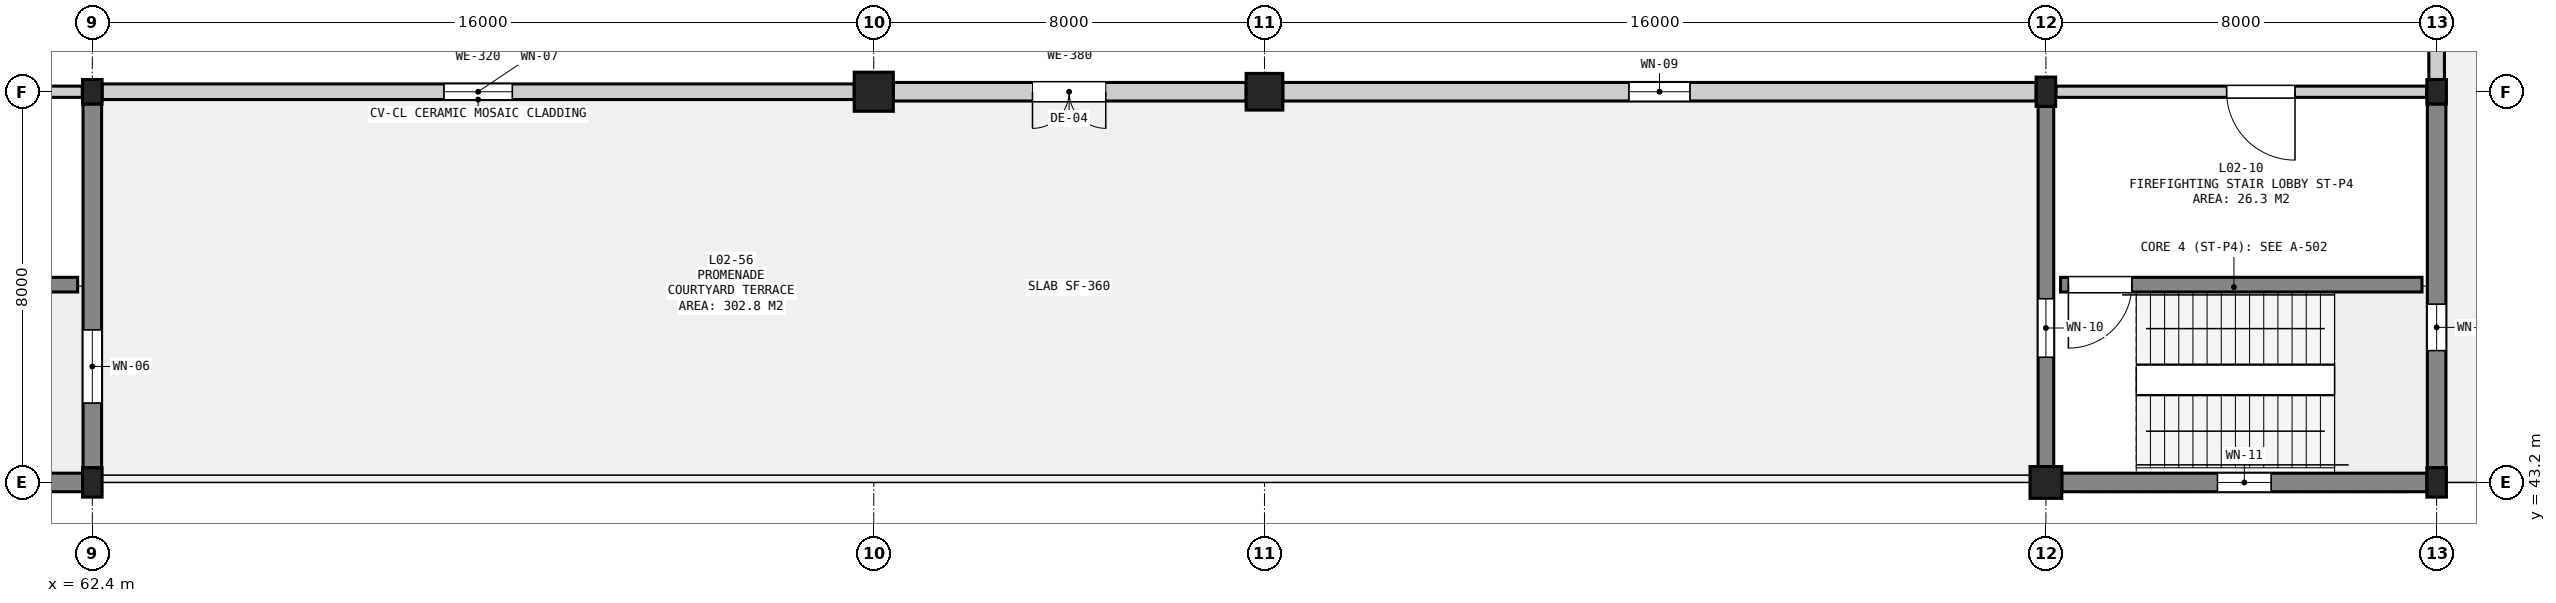
"""IFC4 building model, lengths in metres.
Left out: names, types, materials, properties, quantities, classifications, styles, units other than length and angle.
Written with IfcOpenShell. Run it as: python <this file> out.ifc"""

import sys

from ifc_helpers import new_model, si_unit, direction, frame, frame_2d, origin, origin_2d, place, context, subcontext, project, spatial, rectangle, extrude, element, fill, save


model = new_model("IFC4")
c1 = context("Model", 3, precision=1e-05, world=origin(), true_north=direction((0.0, 1.0)))
c2 = subcontext(c1, "Body", "Model", "MODEL_VIEW")
j1 = project(units=[si_unit("LENGTHUNIT", "METRE"), si_unit("PLANEANGLEUNIT", "RADIAN")], contexts=[c1])
p1 = place(None, origin())
s1 = spatial("IfcSite", under=j1, at=p1, CompositionType="ELEMENT")
p2 = place(p1, origin())
s2 = spatial("IfcBuilding", under=s1, at=p2, CompositionType="ELEMENT")
p3 = place(p2, frame((0.0, 0.0, 10.8)))
s3 = spatial("IfcBuildingStorey", under=s2, at=p3, CompositionType="ELEMENT", Elevation=10.8)
p4 = place(p3, frame((62.4, 43.2, 0.0), z_axis=(0.0, 0.0, 1.0), x_axis=(1.0, 0.0, 0.0)))
e1 = element("IfcColumn", 1, at=p4, inside=s3, PredefinedType="COLUMN", context=c2, shape_type="SweptSolid", body=[
    extrude(rectangle(XDim=0.4, YDim=0.6, at=origin_2d()), origin(), (0.0, 0.0, 1.0), 4.8),
])
p5 = place(p3, frame((62.4, 51.2, 0.0), z_axis=(0.0, 0.0, 1.0), x_axis=(1.0, 0.0, 0.0)))
e2 = element("IfcColumn", 2, at=p5, inside=s3, PredefinedType="COLUMN", context=c2, shape_type="SweptSolid", body=[
    extrude(rectangle(XDim=0.4, YDim=0.5, at=origin_2d()), origin(), (0.0, 0.0, 1.0), 4.8),
])
p6 = place(p3, frame((78.4, 51.2, 0.0), z_axis=(0.0, 0.0, 1.0), x_axis=(1.0, 0.0, 0.0)))
e3 = element("IfcColumn", 3, at=p6, inside=s3, PredefinedType="COLUMN", context=c2, shape_type="SweptSolid", body=[
    extrude(rectangle(XDim=0.8, YDim=0.8, at=origin_2d()), origin(), (0.0, 0.0, 1.0), 4.8),
])
p7 = place(p3, frame((86.4, 51.2, 0.0), z_axis=(0.0, 0.0, 1.0), x_axis=(1.0, 0.0, 0.0)))
e4 = element("IfcColumn", 4, at=p7, inside=s3, PredefinedType="COLUMN", context=c2, shape_type="SweptSolid", body=[
    extrude(rectangle(XDim=0.75, YDim=0.75, at=origin_2d()), origin(), (0.0, 0.0, 1.0), 4.8),
])
p8 = place(p3, frame((102.4, 43.2, 0.0), z_axis=(0.0, 0.0, 1.0), x_axis=(1.0, 0.0, 0.0)))
e5 = element("IfcColumn", 5, at=p8, inside=s3, PredefinedType="COLUMN", context=c2, shape_type="SweptSolid", body=[
    extrude(rectangle(XDim=0.65, YDim=0.65, at=origin_2d()), origin(), (0.0, 0.0, 1.0), 4.8),
])
for number, where, z_axis, x_axis in (
    (6, (102.4, 51.2, 0.0), (0.0, 0.0, 1.0), (1.0, 0.0, 0.0)),
    (7, (110.4, 43.2, 0.0), (0.0, 0.0, 1.0), (1.0, 0.0, 0.0)),
):
    element("IfcColumn", number, at=place(p3, frame(where, z_axis=z_axis, x_axis=x_axis)), inside=s3, PredefinedType="COLUMN", context=c2, shape_type="SweptSolid", body=[
        extrude(rectangle(XDim=0.4, YDim=0.6, at=origin_2d()), origin(), (0.0, 0.0, 1.0), 4.8),
    ])
p9 = place(p3, frame((110.4, 51.2, 0.0), z_axis=(0.0, 0.0, 1.0), x_axis=(1.0, 0.0, 0.0)))
e8 = element("IfcColumn", 8, at=p9, inside=s3, PredefinedType="COLUMN", context=c2, shape_type="SweptSolid", body=[
    extrude(rectangle(XDim=0.4, YDim=0.5, at=origin_2d()), origin(), (0.0, 0.0, 1.0), 4.8),
])
p10 = place(p3, frame((54.725, 43.2, 0.0), z_axis=(0.0, 0.0, 1.0), x_axis=(1.0, 0.0, 0.0)))
e9 = element("IfcWall", 9, at=p10, inside=s3, PredefinedType="SOLIDWALL", context=c2, shape_type="SweptSolid", body=[
    extrude(rectangle(XDim=7.475, YDim=0.38, at=frame_2d((3.737, 0.0))), origin(), (0.0, 0.0, 1.0), 4.195),
])
p11 = place(p10, frame((2.938, 0.0, 0.9)))
e10 = element("IfcOpeningElement", 10, at=p11, cuts=e9, PredefinedType="OPENING", context=c2, shape_type="SweptSolid", body=[
    extrude(rectangle(XDim=1.6, YDim=1.95, at=frame_2d((0.8, 0.975))), frame((0.0, 0.202, 0.0), z_axis=(0.0, -1.0, 0.0), x_axis=(1.0, 0.0, 0.0)), (0.0, 0.0, 1.0), 0.404),
])
p12 = place(p3, frame((62.4, 43.5, 0.0), z_axis=(0.0, 0.0, 1.0), x_axis=(0.0, 1.0, 0.0)))
e11 = element("IfcWall", 11, at=p12, inside=s3, PredefinedType="SOLIDWALL", context=c2, shape_type="SweptSolid", body=[
    extrude(rectangle(XDim=7.45, YDim=0.38, at=frame_2d((3.725, 0.0))), origin(), (0.0, 0.0, 1.0), 4.195),
])
p13 = place(p12, frame((1.325, 0.0, 0.9)))
e12 = element("IfcOpeningElement", 12, at=p13, cuts=e11, PredefinedType="OPENING", context=c2, shape_type="SweptSolid", body=[
    extrude(rectangle(XDim=1.5, YDim=1.85, at=frame_2d((0.75, 0.925))), frame((0.0, 0.202, 0.0), z_axis=(0.0, -1.0, 0.0), x_axis=(1.0, 0.0, 0.0)), (0.0, 0.0, 1.0), 0.404),
])
p14 = place(p3, frame((62.6, 51.2, 0.0), z_axis=(0.0, 0.0, 1.0), x_axis=(1.0, 0.0, 0.0)))
e13 = element("IfcWall", 13, at=p14, inside=s3, PredefinedType="SOLIDWALL", context=c2, shape_type="SweptSolid", body=[
    extrude(rectangle(XDim=15.4, YDim=0.32, at=frame_2d((7.7, 0.0))), origin(), (0.0, 0.0, 1.0), 3.485),
])
p15 = place(p14, frame((7.0, 0.0, 0.9)))
e14 = element("IfcOpeningElement", 14, at=p15, cuts=e13, PredefinedType="OPENING", context=c2, shape_type="SweptSolid", body=[
    extrude(rectangle(XDim=1.4, YDim=1.8, at=frame_2d((0.7, 0.9))), frame((0.0, 0.172, 0.0), z_axis=(0.0, -1.0, 0.0), x_axis=(1.0, 0.0, 0.0)), (0.0, 0.0, 1.0), 0.344),
])
p16 = place(p3, frame((78.8, 51.2, 0.0), z_axis=(0.0, 0.0, 1.0), x_axis=(1.0, 0.0, 0.0)))
e15 = element("IfcWall", 15, at=p16, inside=s3, PredefinedType="SOLIDWALL", context=c2, shape_type="SweptSolid", body=[
    extrude(rectangle(XDim=7.225, YDim=0.38, at=frame_2d((3.612, 0.0))), origin(), (0.0, 0.0, 1.0), 3.9),
])
p17 = place(p16, frame((2.85, 0.0, 0.0)))
e16 = element("IfcOpeningElement", 16, at=p17, cuts=e15, PredefinedType="OPENING", context=c2, shape_type="SweptSolid", body=[
    extrude(rectangle(XDim=1.5, YDim=2.2, at=frame_2d((0.75, 1.1))), frame((0.0, 0.202, 0.0), z_axis=(0.0, -1.0, 0.0), x_axis=(1.0, 0.0, 0.0)), (0.0, 0.0, 1.0), 0.404),
])
p18 = place(p3, frame((86.775, 51.2, 0.0), z_axis=(0.0, 0.0, 1.0), x_axis=(1.0, 0.0, 0.0)))
e17 = element("IfcWall", 17, at=p18, inside=s3, PredefinedType="SOLIDWALL", context=c2, shape_type="SweptSolid", body=[
    extrude(rectangle(XDim=15.425, YDim=0.38, at=frame_2d((7.712, 0.0))), origin(), (0.0, 0.0, 1.0), 3.435),
])
p19 = place(p18, frame((7.087, 0.0, 0.9)))
e18 = element("IfcOpeningElement", 18, at=p19, cuts=e17, PredefinedType="OPENING", context=c2, shape_type="SweptSolid", body=[
    extrude(rectangle(XDim=1.25, YDim=1.9, at=frame_2d((0.625, 0.95))), frame((0.0, 0.202, 0.0), z_axis=(0.0, -1.0, 0.0), x_axis=(1.0, 0.0, 0.0)), (0.0, 0.0, 1.0), 0.404),
])
p20 = place(p3, frame((102.4, 50.9, 0.0), z_axis=(0.0, 0.0, 1.0), x_axis=(0.0, -1.0, 0.0)))
e19 = element("IfcWall", 19, at=p20, inside=s3, PredefinedType="SOLIDWALL", context=c2, shape_type="SweptSolid", body=[
    extrude(rectangle(XDim=7.375, YDim=0.32, at=frame_2d((3.688, 0.0))), origin(), (0.0, 0.0, 1.0), 3.975),
])
p21 = place(p20, frame((3.938, 0.0, 0.9)))
e20 = element("IfcOpeningElement", 20, at=p21, cuts=e19, PredefinedType="OPENING", context=c2, shape_type="SweptSolid", body=[
    extrude(rectangle(XDim=1.2, YDim=1.7, at=frame_2d((0.6, 0.85))), frame((0.0, 0.172, 0.0), z_axis=(0.0, -1.0, 0.0), x_axis=(1.0, 0.0, 0.0)), (0.0, 0.0, 1.0), 0.344),
])
p22 = place(p3, frame((102.725, 43.2, 0.0), z_axis=(0.0, 0.0, 1.0), x_axis=(1.0, 0.0, 0.0)))
e21 = element("IfcWall", 21, at=p22, inside=s3, PredefinedType="SOLIDWALL", context=c2, shape_type="SweptSolid", body=[
    extrude(rectangle(XDim=7.475, YDim=0.38, at=frame_2d((3.737, 0.0))), origin(), (0.0, 0.0, 1.0), 3.895),
])
p23 = place(p22, frame((3.188, 0.0, 0.9)))
e22 = element("IfcOpeningElement", 22, at=p23, cuts=e21, PredefinedType="OPENING", context=c2, shape_type="SweptSolid", body=[
    extrude(rectangle(XDim=1.1, YDim=1.55, at=frame_2d((0.55, 0.775))), frame((0.0, 0.202, 0.0), z_axis=(0.0, -1.0, 0.0), x_axis=(1.0, 0.0, 0.0)), (0.0, 0.0, 1.0), 0.404),
])
p24 = place(p3, frame((110.4, 43.5, 0.0), z_axis=(0.0, 0.0, 1.0), x_axis=(0.0, 1.0, 0.0)))
e23 = element("IfcWall", 23, at=p24, inside=s3, PredefinedType="SOLIDWALL", context=c2, shape_type="SweptSolid", body=[
    extrude(rectangle(XDim=7.45, YDim=0.38, at=frame_2d((3.725, 0.0))), origin(), (0.0, 0.0, 1.0), 3.895),
])
p25 = place(p24, frame((2.4, 0.0, 0.9)))
e24 = element("IfcOpeningElement", 24, at=p25, cuts=e23, PredefinedType="OPENING", context=c2, shape_type="SweptSolid", body=[
    extrude(rectangle(XDim=0.95, YDim=1.45, at=frame_2d((0.475, 0.725))), frame((0.0, 0.202, 0.0), z_axis=(0.0, -1.0, 0.0), x_axis=(1.0, 0.0, 0.0)), (0.0, 0.0, 1.0), 0.404),
])
p26 = place(p3, frame((110.4, 51.45, 0.0), z_axis=(0.0, 0.0, 1.0), x_axis=(0.0, 1.0, 0.0)))
e25 = element("IfcWall", 25, at=p26, inside=s3, PredefinedType="SOLIDWALL", context=c2, shape_type="SweptSolid", body=[
    extrude(rectangle(XDim=7.325, YDim=0.32, at=frame_2d((3.663, 0.0))), origin(), (0.0, 0.0, 1.0), 3.9),
])
p27 = place(p26, frame((3.238, 0.0, 0.9)))
e26 = element("IfcOpeningElement", 26, at=p27, cuts=e25, PredefinedType="OPENING", context=c2, shape_type="SweptSolid", body=[
    extrude(rectangle(XDim=0.85, YDim=1.35, at=frame_2d((0.425, 0.675))), frame((0.0, 0.172, 0.0), z_axis=(0.0, -1.0, 0.0), x_axis=(1.0, 0.0, 0.0)), (0.0, 0.0, 1.0), 0.344),
])
p28 = place(p3, frame((54.7, 47.25, 0.0), z_axis=(0.0, 0.0, 1.0), x_axis=(1.0, 0.0, 0.0)))
e27 = element("IfcWall", 27, at=p28, inside=s3, PredefinedType="SHEAR", context=c2, shape_type="SweptSolid", body=[
    extrude(rectangle(XDim=7.4, YDim=0.3, at=frame_2d((3.7, 0.0))), origin(), (0.0, 0.0, 1.0), 4.5),
])
p29 = place(p28, frame((0.16, 0.0, 0.0)))
e28 = element("IfcOpeningElement", 28, at=p29, cuts=e27, PredefinedType="OPENING", context=c2, shape_type="SweptSolid", body=[
    extrude(rectangle(XDim=1.3, YDim=2.18, at=frame_2d((0.65, 1.09))), frame((0.0, 0.162, 0.0), z_axis=(0.0, -1.0, 0.0), x_axis=(1.0, 0.0, 0.0)), (0.0, 0.0, 1.0), 0.324),
])
p30 = place(p3, frame((102.7, 47.25, 0.0), z_axis=(0.0, 0.0, 1.0), x_axis=(1.0, 0.0, 0.0)))
e29 = element("IfcWall", 29, at=p30, inside=s3, PredefinedType="SHEAR", context=c2, shape_type="SweptSolid", body=[
    extrude(rectangle(XDim=7.4, YDim=0.3, at=frame_2d((3.7, 0.0))), origin(), (0.0, 0.0, 1.0), 4.5),
])
p31 = place(p30, frame((0.16, 0.0, 0.0)))
e30 = element("IfcOpeningElement", 30, at=p31, cuts=e29, PredefinedType="OPENING", context=c2, shape_type="SweptSolid", body=[
    extrude(rectangle(XDim=1.3, YDim=2.18, at=frame_2d((0.65, 1.09))), frame((0.0, 0.162, 0.0), z_axis=(0.0, -1.0, 0.0), x_axis=(1.0, 0.0, 0.0)), (0.0, 0.0, 1.0), 0.324),
])
p32 = place(p3, frame((54.54, 51.2, 0.0), z_axis=(0.0, 0.0, 1.0), x_axis=(1.0, 0.0, 0.0)))
e31 = element("IfcWall", 31, at=p32, inside=s3, PredefinedType="SOLIDWALL", context=c2, shape_type="SweptSolid", body=[
    extrude(rectangle(XDim=7.655, YDim=0.23, at=frame_2d((3.828, 0.0))), origin(), (0.0, 0.0, 1.0), 3.695),
])
p33 = place(p32, frame((3.56, 0.0, 0.0)))
e32 = element("IfcOpeningElement", 32, at=p33, cuts=e31, PredefinedType="OPENING", context=c2, shape_type="SweptSolid", body=[
    extrude(rectangle(XDim=1.4, YDim=2.2, at=frame_2d((0.7, 1.1))), frame((0.0, 0.127, 0.0), z_axis=(0.0, -1.0, 0.0), x_axis=(1.0, 0.0, 0.0)), (0.0, 0.0, 1.0), 0.254),
])
p34 = place(p3, frame((102.605, 51.2, 0.0), z_axis=(0.0, 0.0, 1.0), x_axis=(1.0, 0.0, 0.0)))
e33 = element("IfcWall", 33, at=p34, inside=s3, PredefinedType="SOLIDWALL", context=c2, shape_type="SweptSolid", body=[
    extrude(rectangle(XDim=7.59, YDim=0.23, at=frame_2d((3.795, 0.0))), origin(), (0.0, 0.0, 1.0), 3.895),
])
p35 = place(p34, frame((3.495, 0.0, 0.0)))
e34 = element("IfcOpeningElement", 34, at=p35, cuts=e33, PredefinedType="OPENING", context=c2, shape_type="SweptSolid", body=[
    extrude(rectangle(XDim=1.4, YDim=2.2, at=frame_2d((0.7, 1.1))), frame((0.0, 0.127, 0.0), z_axis=(0.0, -1.0, 0.0), x_axis=(1.0, 0.0, 0.0)), (0.0, 0.0, 1.0), 0.254),
])
p36 = place(p13, origin())
e35 = element("IfcWindow", 35, at=p36, inside=s3, PartitioningType="SINGLE_PANEL", PredefinedType="WINDOW", context=c2, shape_type="SweptSolid", body=[
    extrude(rectangle(XDim=1.5, YDim=1.85, at=frame_2d((0.75, 0.925))), frame((0.0, 0.03, 0.0), z_axis=(0.0, -1.0, 0.0), x_axis=(1.0, 0.0, 0.0)), (0.0, 0.0, 1.0), 0.06),
])
fill(e12, e35)
p37 = place(p15, origin())
e36 = element("IfcWindow", 36, at=p37, inside=s3, PartitioningType="SINGLE_PANEL", PredefinedType="WINDOW", context=c2, shape_type="SweptSolid", body=[
    extrude(rectangle(XDim=1.4, YDim=1.8, at=frame_2d((0.7, 0.9))), frame((0.0, 0.03, 0.0), z_axis=(0.0, -1.0, 0.0), x_axis=(1.0, 0.0, 0.0)), (0.0, 0.0, 1.0), 0.06),
])
fill(e14, e36)
p38 = place(p17, frame((1.5, 0.0, 0.0), z_axis=(0.0, 0.0, 1.0), x_axis=(-1.0, 0.0, 0.0)))
e37 = element("IfcDoor", 37, at=p38, inside=s3, OperationType="DOUBLE_DOOR_SINGLE_SWING", PredefinedType="DOOR", context=c2, shape_type="SweptSolid", body=[
    extrude(rectangle(XDim=1.5, YDim=2.2, at=frame_2d((0.75, 1.1))), frame((0.0, 0.025, 0.0), z_axis=(0.0, -1.0, 0.0), x_axis=(1.0, 0.0, 0.0)), (0.0, 0.0, 1.0), 0.05),
])
fill(e16, e37)
p39 = place(p19, origin())
e38 = element("IfcWindow", 38, at=p39, inside=s3, PartitioningType="SINGLE_PANEL", PredefinedType="WINDOW", context=c2, shape_type="SweptSolid", body=[
    extrude(rectangle(XDim=1.25, YDim=1.9, at=frame_2d((0.625, 0.95))), frame((0.0, 0.03, 0.0), z_axis=(0.0, -1.0, 0.0), x_axis=(1.0, 0.0, 0.0)), (0.0, 0.0, 1.0), 0.06),
])
fill(e18, e38)
p40 = place(p21, origin())
e39 = element("IfcWindow", 39, at=p40, inside=s3, PartitioningType="SINGLE_PANEL", PredefinedType="WINDOW", context=c2, shape_type="SweptSolid", body=[
    extrude(rectangle(XDim=1.2, YDim=1.7, at=frame_2d((0.6, 0.85))), frame((0.0, 0.03, 0.0), z_axis=(0.0, -1.0, 0.0), x_axis=(1.0, 0.0, 0.0)), (0.0, 0.0, 1.0), 0.06),
])
fill(e20, e39)
p41 = place(p23, origin())
e40 = element("IfcWindow", 40, at=p41, inside=s3, PartitioningType="SINGLE_PANEL", PredefinedType="WINDOW", context=c2, shape_type="SweptSolid", body=[
    extrude(rectangle(XDim=1.1, YDim=1.55, at=frame_2d((0.55, 0.775))), frame((0.0, 0.03, 0.0), z_axis=(0.0, -1.0, 0.0), x_axis=(1.0, 0.0, 0.0)), (0.0, 0.0, 1.0), 0.06),
])
fill(e22, e40)
p42 = place(p25, origin())
e41 = element("IfcWindow", 41, at=p42, inside=s3, PartitioningType="SINGLE_PANEL", PredefinedType="WINDOW", context=c2, shape_type="SweptSolid", body=[
    extrude(rectangle(XDim=0.95, YDim=1.45, at=frame_2d((0.475, 0.725))), frame((0.0, 0.03, 0.0), z_axis=(0.0, -1.0, 0.0), x_axis=(1.0, 0.0, 0.0)), (0.0, 0.0, 1.0), 0.06),
])
fill(e24, e41)
p43 = place(p31, frame((1.3, 0.0, 0.0), z_axis=(0.0, 0.0, 1.0), x_axis=(-1.0, 0.0, 0.0)))
e42 = element("IfcDoor", 42, at=p43, inside=s3, OperationType="SINGLE_SWING_RIGHT", PredefinedType="DOOR", context=c2, shape_type="SweptSolid", body=[
    extrude(rectangle(XDim=1.3, YDim=2.18, at=frame_2d((0.65, 1.09))), frame((0.0, 0.025, 0.0), z_axis=(0.0, -1.0, 0.0), x_axis=(1.0, 0.0, 0.0)), (0.0, 0.0, 1.0), 0.05),
])
fill(e30, e42)
p44 = place(p35, frame((1.4, 0.0, 0.0), z_axis=(0.0, 0.0, 1.0), x_axis=(-1.0, 0.0, 0.0)))
e43 = element("IfcDoor", 43, at=p44, inside=s3, OperationType="SINGLE_SWING_LEFT", PredefinedType="DOOR", context=c2, shape_type="SweptSolid", body=[
    extrude(rectangle(XDim=1.4, YDim=2.2, at=frame_2d((0.7, 1.1))), frame((0.0, 0.025, 0.0), z_axis=(0.0, -1.0, 0.0), x_axis=(1.0, 0.0, 0.0)), (0.0, 0.0, 1.0), 0.05),
])
fill(e34, e43)
save(model, sys.argv[1])
